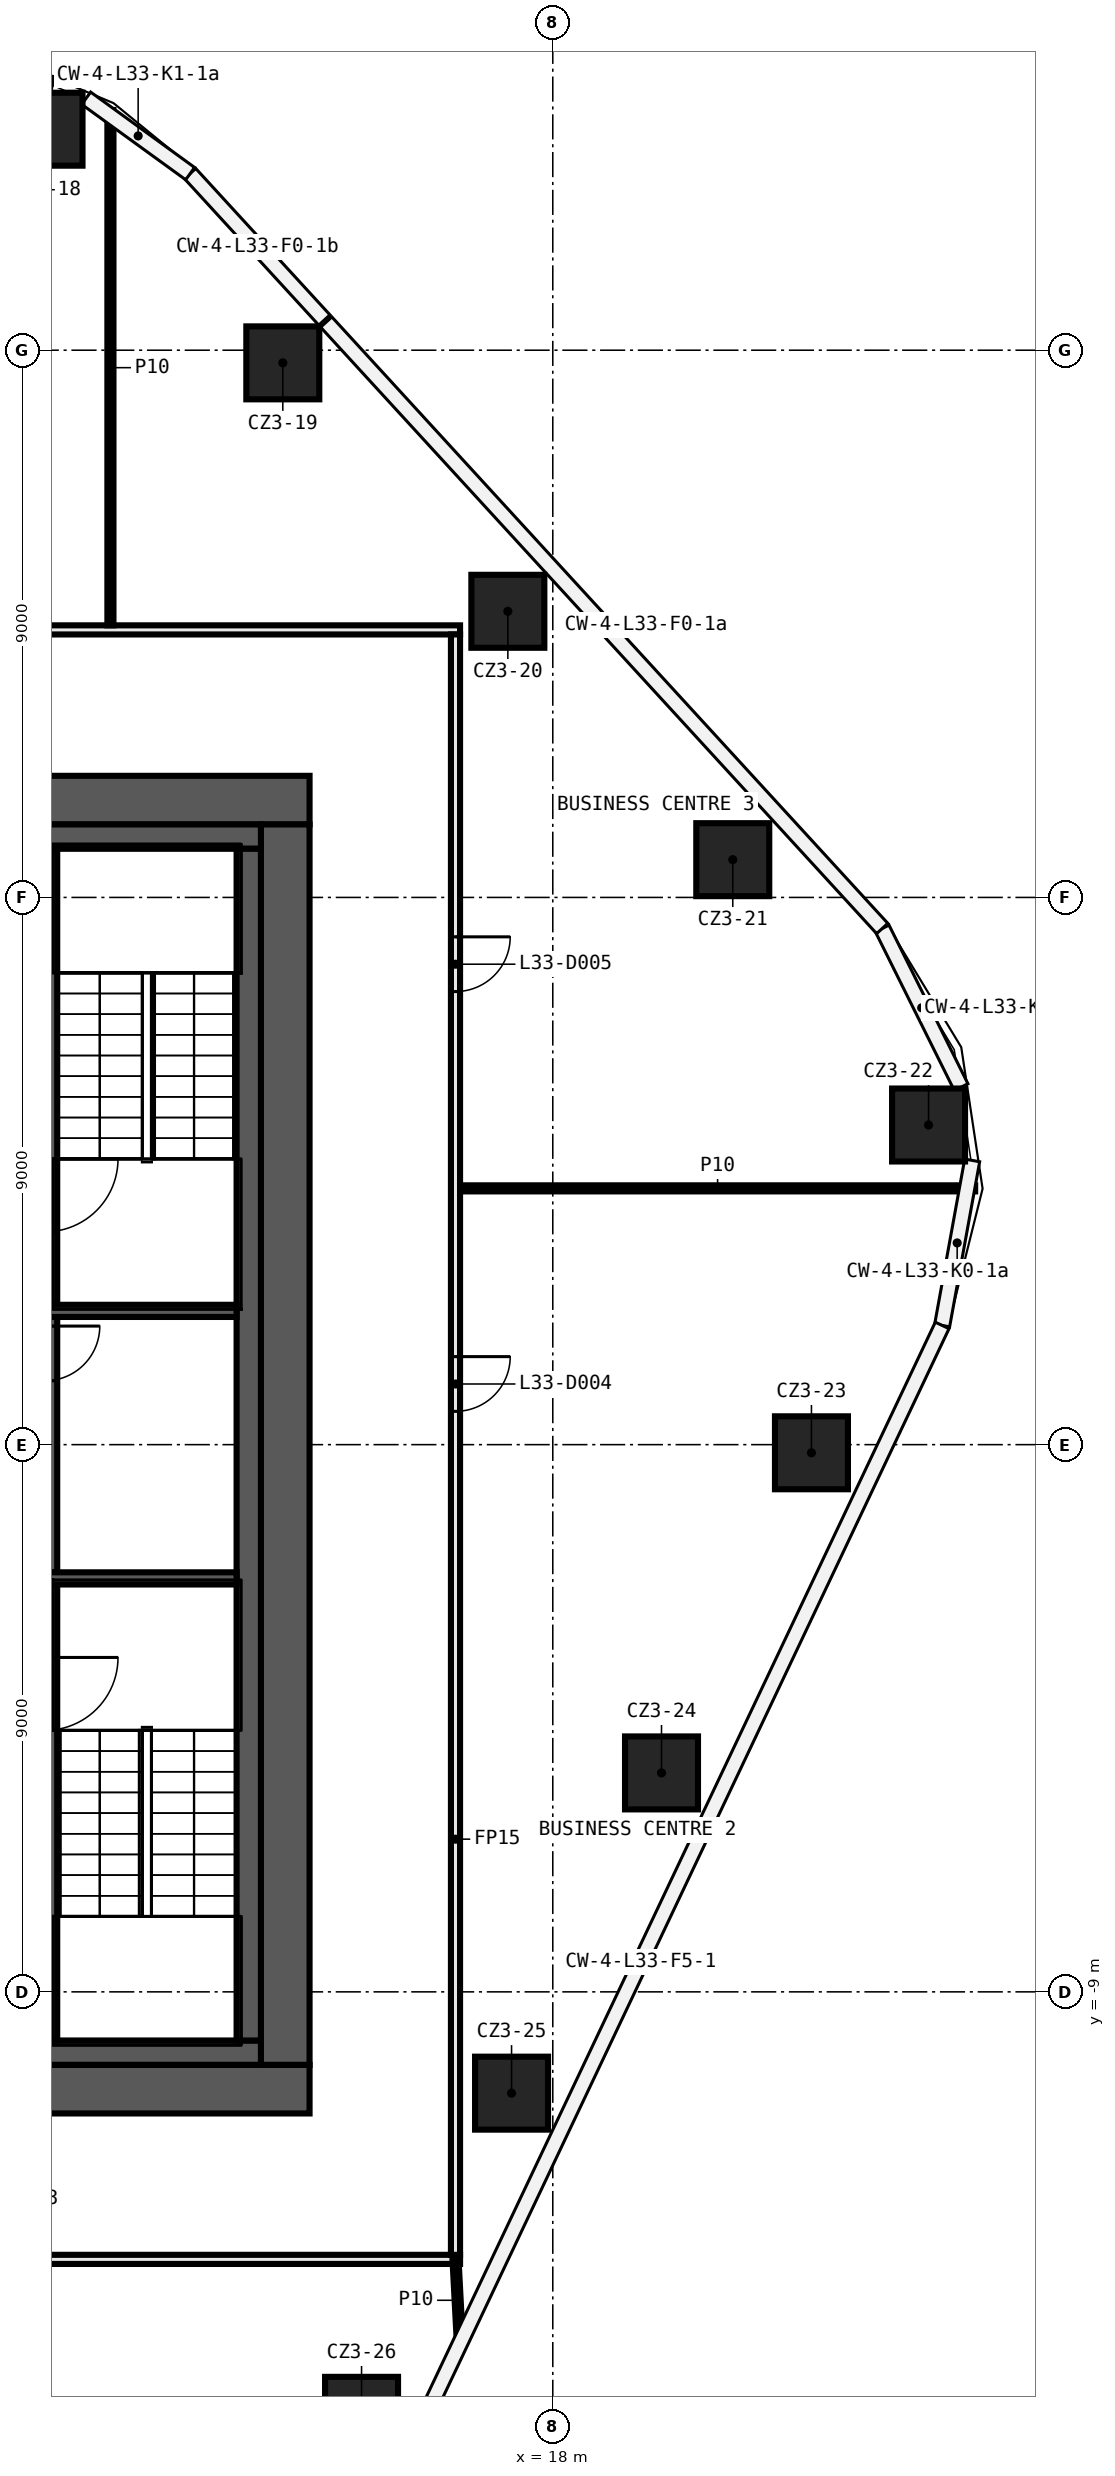
"""IFC4 building model, lengths in metres.
Left out: names, types, materials, properties, quantities, classifications, styles, units other than length and angle.
Written with IfcOpenShell. Run it as: python <this file> out.ifc"""

import sys

from ifc_helpers import new_model, si_unit, direction, frame, frame_2d, origin, origin_2d, place, context, subcontext, project, spatial, rectangle, extrude, element, fill, save


model = new_model("IFC4")
c1 = context("Model", 3, precision=1e-05, world=origin(), true_north=direction((0.0, 1.0)))
c2 = subcontext(c1, "Body", "Model", "MODEL_VIEW")
j1 = project(units=[si_unit("LENGTHUNIT", "METRE"), si_unit("PLANEANGLEUNIT", "RADIAN")], contexts=[c1])
p1 = place(None, origin())
s1 = spatial("IfcSite", under=j1, at=p1, CompositionType="ELEMENT")
p2 = place(p1, origin())
s2 = spatial("IfcBuilding", under=s1, at=p2, CompositionType="ELEMENT")
p3 = place(p2, frame((0.0, 0.0, 151.6)))
s3 = spatial("IfcBuildingStorey", under=s2, at=p3, CompositionType="ELEMENT", Elevation=151.6)
for number, where, z_axis, x_axis in (
    (1, (9.666, 21.635, 0.0), (0.0, 0.0, 1.0), (1.0, 0.0, 0.0)),
    (2, (13.56, 17.792, 0.0), (0.0, 0.0, 1.0), (1.0, 0.0, 0.0)),
    (3, (17.261, 13.706, 0.0), (0.0, 0.0, 1.0), (1.0, 0.0, 0.0)),
    (4, (20.96, 9.621, 0.0), (0.0, 0.0, 1.0), (1.0, 0.0, 0.0)),
    (5, (24.18, 5.257, 0.0), (0.0, 0.0, 1.0), (1.0, 0.0, 0.0)),
    (6, (22.254, -0.134, 0.0), (0.0, 0.0, 1.0), (1.0, 0.0, 0.0)),
    (7, (19.788, -5.399, 0.0), (0.0, 0.0, 1.0), (1.0, 0.0, 0.0)),
    (8, (17.322, -10.666, 0.0), (0.0, 0.0, 1.0), (1.0, 0.0, 0.0)),
    (9, (14.855, -15.932, 0.0), (0.0, 0.0, 1.0), (1.0, 0.0, 0.0)),
):
    element("IfcColumn", number, at=place(p3, frame(where, z_axis=z_axis, x_axis=x_axis)), inside=s3, PredefinedType="COLUMN", context=c2, shape_type="SweptSolid", body=[
        extrude(rectangle(XDim=1.2, YDim=1.2, at=origin_2d()), origin(), (0.0, 0.0, 1.0), 6.62),
    ])
p4 = place(p3, frame((16.475, -13.4, 0.0), z_axis=(0.0, 0.0, 1.0), x_axis=(-1.0, 0.0, 0.0)))
e10 = element("IfcWall", 10, at=p4, inside=s3, PredefinedType="PARTITIONING", context=c2, shape_type="SweptSolid", body=[
    extrude(rectangle(XDim=32.95, YDim=0.15, at=frame_2d((16.475, 0.0))), origin(), (0.0, 0.0, 1.0), 6.62),
])
p5 = place(p4, frame((22.568, 0.0, 0.0)))
e11 = element("IfcOpeningElement", 11, at=p5, cuts=e10, PredefinedType="OPENING", context=c2, shape_type="SweptSolid", body=[
    extrude(rectangle(XDim=0.9, YDim=2.1, at=frame_2d((0.45, 1.05))), frame((0.0, 0.085, 0.0), z_axis=(0.0, -1.0, 0.0), x_axis=(1.0, 0.0, 0.0)), (0.0, 0.0, 1.0), 0.17),
])
p6 = place(p4, frame((6.926, 0.0, 0.0)))
e12 = element("IfcOpeningElement", 12, at=p6, cuts=e10, PredefinedType="OPENING", context=c2, shape_type="SweptSolid", body=[
    extrude(rectangle(XDim=0.9, YDim=2.1, at=frame_2d((0.45, 1.05))), frame((0.0, 0.085, 0.0), z_axis=(0.0, -1.0, 0.0), x_axis=(1.0, 0.0, 0.0)), (0.0, 0.0, 1.0), 0.17),
])
p7 = place(p3, frame((16.475, 4.215, 0.0), z_axis=(0.0, 0.0, 1.0), x_axis=(1.0, 0.0, 0.0)))
e13 = element("IfcWall", 13, at=p7, inside=s3, PredefinedType="PARTITIONING", context=c2, shape_type="SweptSolid", body=[
    extrude(rectangle(XDim=8.471, YDim=0.1, at=frame_2d((4.236, 0.0))), origin(), (0.0, 0.0, 1.0), 6.62),
])
p8 = place(p3, frame((-16.45, 13.4, 0.0), z_axis=(0.0, 0.0, 1.0), x_axis=(1.0, 0.0, 0.0)))
e14 = element("IfcWall", 14, at=p8, inside=s3, PredefinedType="PARTITIONING", context=c2, shape_type="SweptSolid", body=[
    extrude(rectangle(XDim=32.925, YDim=0.15, at=frame_2d((16.462, 0.0))), origin(), (0.0, 0.0, 1.0), 6.62),
])
p9 = place(p8, frame((23.018, 0.0, 0.0)))
e15 = element("IfcOpeningElement", 15, at=p9, cuts=e14, PredefinedType="OPENING", context=c2, shape_type="SweptSolid", body=[
    extrude(rectangle(XDim=0.9, YDim=2.1, at=frame_2d((0.45, 1.05))), frame((0.0, 0.085, 0.0), z_axis=(0.0, -1.0, 0.0), x_axis=(1.0, 0.0, 0.0)), (0.0, 0.0, 1.0), 0.17),
])
p10 = place(p8, frame((6.927, 0.0, 0.0)))
e16 = element("IfcOpeningElement", 16, at=p10, cuts=e14, PredefinedType="OPENING", context=c2, shape_type="SweptSolid", body=[
    extrude(rectangle(XDim=0.9, YDim=2.1, at=frame_2d((0.45, 1.05))), frame((0.0, 0.085, 0.0), z_axis=(0.0, -1.0, 0.0), x_axis=(1.0, 0.0, 0.0)), (0.0, 0.0, 1.0), 0.17),
])
p11 = place(p3, frame((16.4, 13.325, 0.0), z_axis=(0.0, 0.0, 1.0), x_axis=(0.0, -1.0, 0.0)))
e17 = element("IfcWall", 17, at=p11, inside=s3, PredefinedType="PARTITIONING", context=c2, shape_type="SweptSolid", body=[
    extrude(rectangle(XDim=26.65, YDim=0.15, at=frame_2d((13.325, 0.0))), origin(), (0.0, 0.0, 1.0), 6.62),
])
p12 = place(p11, frame((11.877, 0.0, 0.0)))
e18 = element("IfcOpeningElement", 18, at=p12, cuts=e17, PredefinedType="OPENING", context=c2, shape_type="SweptSolid", body=[
    extrude(rectangle(XDim=0.9, YDim=2.1, at=frame_2d((0.45, 1.05))), frame((0.0, 0.085, 0.0), z_axis=(0.0, -1.0, 0.0), x_axis=(1.0, 0.0, 0.0)), (0.0, 0.0, 1.0), 0.17),
])
p13 = place(p11, frame((4.973, 0.0, 0.0)))
e19 = element("IfcOpeningElement", 19, at=p13, cuts=e17, PredefinedType="OPENING", context=c2, shape_type="SweptSolid", body=[
    extrude(rectangle(XDim=0.9, YDim=2.1, at=frame_2d((0.45, 1.05))), frame((0.0, 0.085, 0.0), z_axis=(0.0, -1.0, 0.0), x_axis=(1.0, 0.0, 0.0)), (0.0, 0.0, 1.0), 0.17),
])
p14 = place(p3, frame((10.725, 13.475, 0.0), z_axis=(0.0, 0.0, 1.0), x_axis=(0.0, 1.0, 0.0)))
e20 = element("IfcWall", 20, at=p14, inside=s3, PredefinedType="PARTITIONING", context=c2, shape_type="SweptSolid", body=[
    extrude(rectangle(XDim=8.476, YDim=0.1, at=frame_2d((4.238, 0.0))), origin(), (0.0, 0.0, 1.0), 6.62),
])
p15 = place(p3, frame((16.4, -13.4, 0.0), z_axis=(0.0, 0.0, 1.0), x_axis=(0.052197349417, -0.998636789185, 0.0)))
e21 = element("IfcWall", 21, at=p15, inside=s3, PredefinedType="PARTITIONING", context=c2, shape_type="SweptSolid", body=[
    extrude(rectangle(XDim=1.347, YDim=0.1, at=frame_2d((0.674, 0.0))), origin(), (0.0, 0.0, 1.0), 6.62),
])
p16 = place(p3, frame((-14.0, 10.6, 0.0), z_axis=(0.0, 0.0, 1.0), x_axis=(1.0, 0.0, 0.0)))
e22 = element("IfcWall", 22, at=p16, inside=s3, PredefinedType="SHEAR", context=c2, shape_type="SweptSolid", body=[
    extrude(rectangle(XDim=28.0, YDim=0.8, at=frame_2d((14.0, 0.0))), origin(), (0.0, 0.0, 1.0), 6.62),
])
p17 = place(p16, frame((15.9, 0.0, 0.0)))
e23 = element("IfcOpeningElement", 23, at=p17, cuts=e22, PredefinedType="OPENING", context=c2, shape_type="SweptSolid", body=[
    extrude(rectangle(XDim=1.6, YDim=2.1, at=frame_2d((0.8, 1.05))), frame((0.0, 0.41, 0.0), z_axis=(0.0, -1.0, 0.0), x_axis=(1.0, 0.0, 0.0)), (0.0, 0.0, 1.0), 0.82),
])
p18 = place(p3, frame((14.0, -10.6, 0.0), z_axis=(0.0, 0.0, 1.0), x_axis=(-1.0, 0.0, 0.0)))
e24 = element("IfcWall", 24, at=p18, inside=s3, PredefinedType="SHEAR", context=c2, shape_type="SweptSolid", body=[
    extrude(rectangle(XDim=28.0, YDim=0.8, at=frame_2d((14.0, 0.0))), origin(), (0.0, 0.0, 1.0), 6.62),
])
p19 = place(p18, frame((5.1, 0.0, 0.0)))
e25 = element("IfcOpeningElement", 25, at=p19, cuts=e24, PredefinedType="OPENING", context=c2, shape_type="SweptSolid", body=[
    extrude(rectangle(XDim=1.6, YDim=2.1, at=frame_2d((0.8, 1.05))), frame((0.0, 0.41, 0.0), z_axis=(0.0, -1.0, 0.0), x_axis=(1.0, 0.0, 0.0)), (0.0, 0.0, 1.0), 0.82),
])
p20 = place(p3, frame((13.6, 10.2, 0.0), z_axis=(0.0, 0.0, 1.0), x_axis=(0.0, -1.0, 0.0)))
e26 = element("IfcWall", 26, at=p20, inside=s3, PredefinedType="SHEAR", context=c2, shape_type="SweptSolid", body=[
    extrude(rectangle(XDim=20.4, YDim=0.8, at=frame_2d((10.2, 0.0))), origin(), (0.0, 0.0, 1.0), 6.62),
])
p21 = place(p3, frame((3.9, 10.0, 0.0), z_axis=(0.0, 0.0, 1.0), x_axis=(1.0, 0.0, 0.0)))
e27 = element("IfcWall", 27, at=p21, inside=s3, PredefinedType="SHEAR", context=c2, shape_type="SweptSolid", body=[
    extrude(rectangle(XDim=9.3, YDim=0.4, at=frame_2d((4.65, 0.0))), origin(), (0.0, 0.0, 1.0), 6.62),
])
p22 = place(p3, frame((13.2, -10.0, 0.0), z_axis=(0.0, 0.0, 1.0), x_axis=(-1.0, 0.0, 0.0)))
e28 = element("IfcWall", 28, at=p22, inside=s3, PredefinedType="SHEAR", context=c2, shape_type="SweptSolid", body=[
    extrude(rectangle(XDim=3.9, YDim=0.4, at=frame_2d((1.95, 0.0))), origin(), (0.0, 0.0, 1.0), 6.62),
])
p23 = place(p3, frame((13.0, 9.8, 0.0), z_axis=(0.0, 0.0, 1.0), x_axis=(0.0, -1.0, 0.0)))
e29 = element("IfcWall", 29, at=p23, inside=s3, PredefinedType="SHEAR", context=c2, shape_type="SweptSolid", body=[
    extrude(rectangle(XDim=19.6, YDim=0.4, at=frame_2d((9.8, 0.0))), origin(), (0.0, 0.0, 1.0), 6.62),
])
p24 = place(p3, frame((9.65, -2.3, 0.0), z_axis=(0.0, 0.0, 1.0), x_axis=(0.0, -1.0, 0.0)))
e30 = element("IfcWall", 30, at=p24, inside=s3, PredefinedType="SHEAR", context=c2, shape_type="SweptSolid", body=[
    extrude(rectangle(XDim=7.5, YDim=0.4, at=frame_2d((3.75, 0.0))), origin(), (0.0, 0.0, 1.0), 6.62),
])
p25 = place(p24, frame((1.2, 0.0, 0.0)))
e31 = element("IfcOpeningElement", 31, at=p25, cuts=e30, PredefinedType="OPENING", context=c2, shape_type="SweptSolid", body=[
    extrude(rectangle(XDim=1.2, YDim=2.1, at=frame_2d((0.6, 1.05))), frame((0.0, 0.21, 0.0), z_axis=(0.0, -1.0, 0.0), x_axis=(1.0, 0.0, 0.0)), (0.0, 0.0, 1.0), 0.42),
])
p26 = place(p3, frame((9.65, 2.1, 0.0), z_axis=(0.0, 0.0, 1.0), x_axis=(0.0, -1.0, 0.0)))
e32 = element("IfcWall", 32, at=p26, inside=s3, PredefinedType="SHEAR", context=c2, shape_type="SweptSolid", body=[
    extrude(rectangle(XDim=4.2, YDim=0.4, at=frame_2d((2.1, 0.0))), origin(), (0.0, 0.0, 1.0), 6.62),
])
p27 = place(p26, frame((0.15, 0.0, 0.0)))
e33 = element("IfcOpeningElement", 33, at=p27, cuts=e32, PredefinedType="OPENING", context=c2, shape_type="SweptSolid", body=[
    extrude(rectangle(XDim=0.9, YDim=2.1, at=frame_2d((0.45, 1.05))), frame((0.0, 0.21, 0.0), z_axis=(0.0, -1.0, 0.0), x_axis=(1.0, 0.0, 0.0)), (0.0, 0.0, 1.0), 0.42),
])
p28 = place(p3, frame((9.65, 9.8, 0.0), z_axis=(0.0, 0.0, 1.0), x_axis=(0.0, -1.0, 0.0)))
e34 = element("IfcWall", 34, at=p28, inside=s3, PredefinedType="SHEAR", context=c2, shape_type="SweptSolid", body=[
    extrude(rectangle(XDim=7.5, YDim=0.4, at=frame_2d((3.75, 0.0))), origin(), (0.0, 0.0, 1.0), 6.62),
])
p29 = place(p28, frame((5.1, 0.0, 0.0)))
e35 = element("IfcOpeningElement", 35, at=p29, cuts=e34, PredefinedType="OPENING", context=c2, shape_type="SweptSolid", body=[
    extrude(rectangle(XDim=1.2, YDim=2.1, at=frame_2d((0.6, 1.05))), frame((0.0, 0.21, 0.0), z_axis=(0.0, -1.0, 0.0), x_axis=(1.0, 0.0, 0.0)), (0.0, 0.0, 1.0), 0.42),
])
for number, where, z_axis, x_axis in (
    (36, (9.45, 2.2, 0.0), (0.0, 0.0, 1.0), (1.0, 0.0, 0.0)),
    (37, (9.45, -2.2, 0.0), (0.0, 0.0, 1.0), (1.0, 0.0, 0.0)),
):
    element("IfcWall", number, at=place(p3, frame(where, z_axis=z_axis, x_axis=x_axis)), inside=s3, PredefinedType="SHEAR", context=c2, shape_type="SweptSolid", body=[
        extrude(rectangle(XDim=3.35, YDim=0.2, at=frame_2d((1.675, 0.0))), origin(), (0.0, 0.0, 1.0), 6.62),
    ])
p30 = place(p12, origin())
e38 = element("IfcDoor", 38, at=p30, inside=s3, OperationType="SINGLE_SWING_LEFT", PredefinedType="DOOR", context=c2, shape_type="SweptSolid", body=[
    extrude(rectangle(XDim=0.9, YDim=2.1, at=frame_2d((0.45, 1.05))), frame((0.0, 0.025, 0.0), z_axis=(0.0, -1.0, 0.0), x_axis=(1.0, 0.0, 0.0)), (0.0, 0.0, 1.0), 0.05),
])
fill(e18, e38)
p31 = place(p13, origin())
e39 = element("IfcDoor", 39, at=p31, inside=s3, OperationType="SINGLE_SWING_RIGHT", PredefinedType="DOOR", context=c2, shape_type="SweptSolid", body=[
    extrude(rectangle(XDim=0.9, YDim=2.1, at=frame_2d((0.45, 1.05))), frame((0.0, 0.025, 0.0), z_axis=(0.0, -1.0, 0.0), x_axis=(1.0, 0.0, 0.0)), (0.0, 0.0, 1.0), 0.05),
])
fill(e19, e39)
save(model, sys.argv[1])
